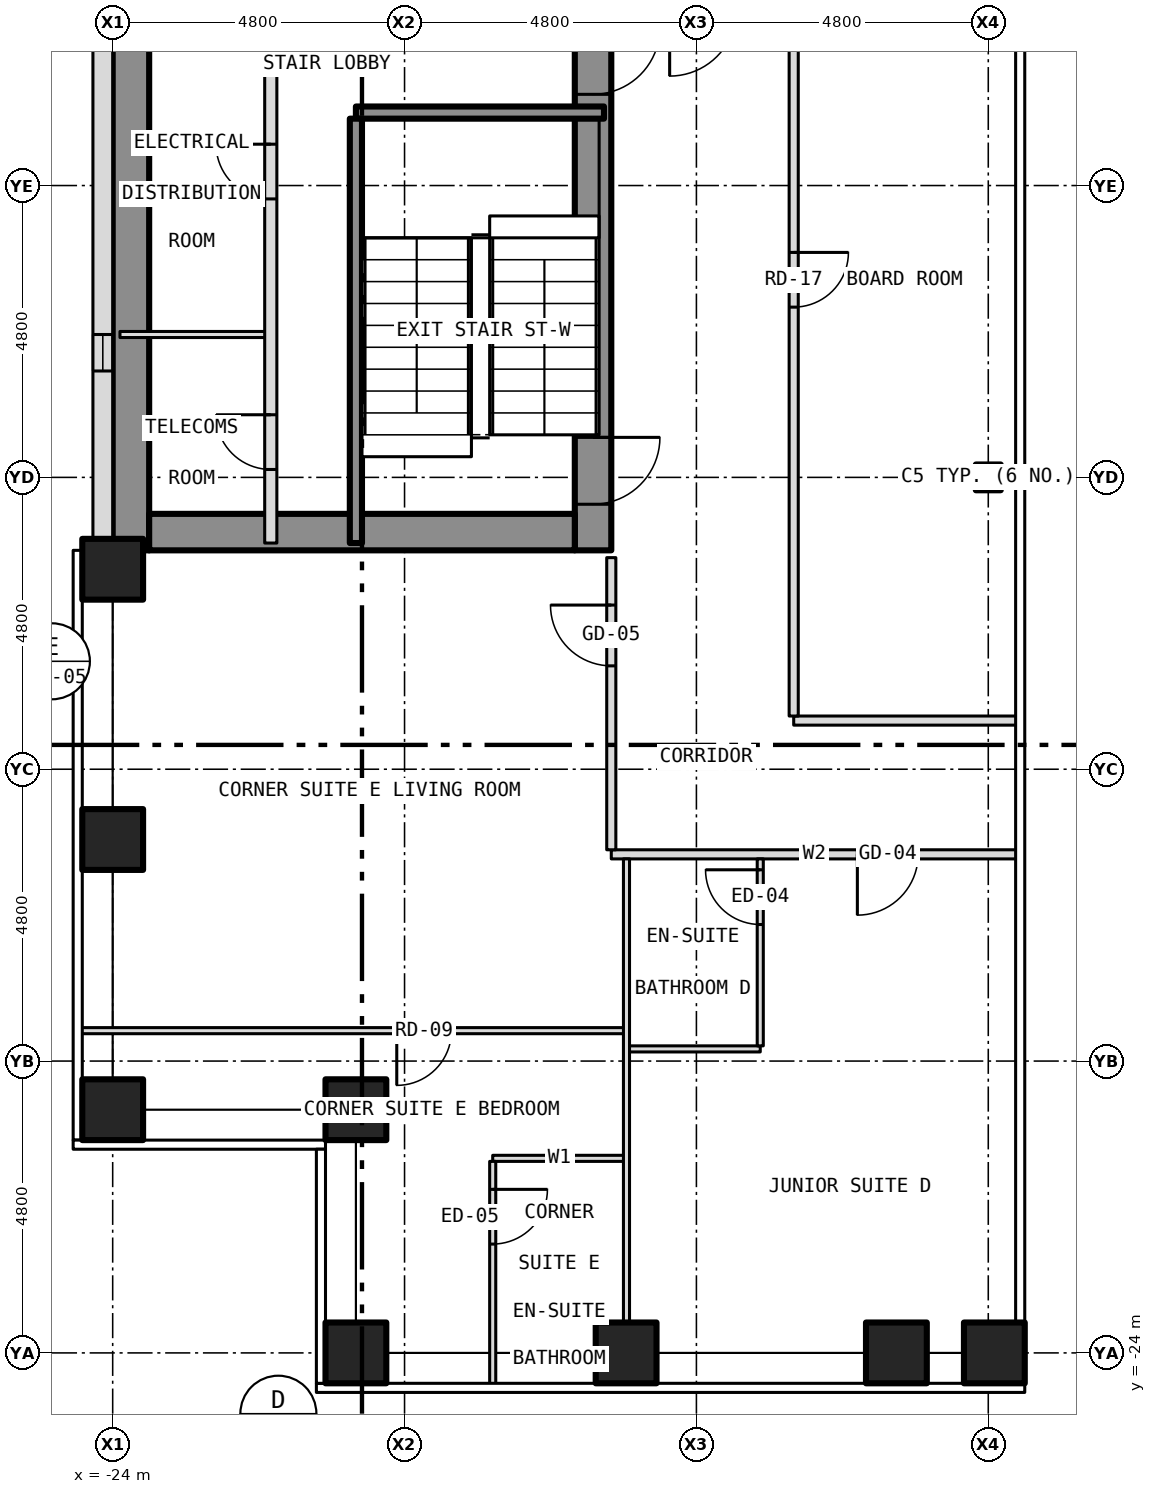
"""IFC4 building model, lengths in metres.
Left out: names, types, materials, properties, quantities, classifications, styles, units other than length and angle.
Written with IfcOpenShell. Run it as: python <this file> out.ifc"""

import sys

from ifc_helpers import new_model, si_unit, direction, frame, frame_2d, origin, origin_2d, place, context, subcontext, project, spatial, rectangle, hollow_rectangle, i_section, extrude, element, fill, save


model = new_model("IFC4")
c1 = context("Model", 3, precision=1e-05, world=origin(), true_north=direction((0.0, 1.0)))
c2 = subcontext(c1, "Body", "Model", "MODEL_VIEW")
j1 = project(units=[si_unit("LENGTHUNIT", "METRE"), si_unit("PLANEANGLEUNIT", "RADIAN")], contexts=[c1])
p1 = place(None, origin())
s1 = spatial("IfcSite", under=j1, at=p1, CompositionType="ELEMENT")
p2 = place(p1, origin())
s2 = spatial("IfcBuilding", under=s1, at=p2, CompositionType="ELEMENT")
p3 = place(p2, frame((0.0, 0.0, 77.5)))
s3 = spatial("IfcBuildingStorey", under=s2, at=p3, CompositionType="ELEMENT", Elevation=77.5)
for number, where, z_axis, x_axis in (
    (1, (-20.0, -24.0, -0.15), (0.0, 0.0, 1.0), (1.0, 0.0, 0.0)),
    (2, (-15.556, -24.0, -0.15), (0.0, 0.0, 1.0), (1.0, 0.0, 0.0)),
    (3, (-11.111, -24.0, -0.15), (0.0, 0.0, 1.0), (1.0, 0.0, 0.0)),
    (4, (-24.0, -20.0, -0.15), (0.0, 0.0, 1.0), (1.0, 0.0, 0.0)),
    (5, (-24.0, -15.556, -0.15), (0.0, 0.0, 1.0), (1.0, 0.0, 0.0)),
    (6, (-24.0, -11.111, -0.15), (0.0, 0.0, 1.0), (1.0, 0.0, 0.0)),
    (7, (-20.0, -20.0, -0.15), (0.0, 0.0, 1.0), (1.0, 0.0, 0.0)),
    (8, (-9.5, -24.0, -0.15), (0.0, 0.0, 1.0), (1.0, 0.0, 0.0)),
):
    element("IfcColumn", number, at=place(p3, frame(where, z_axis=z_axis, x_axis=x_axis)), inside=s3, PredefinedType="COLUMN", context=c2, shape_type="SweptSolid", body=[
        extrude(hollow_rectangle(XDim=1.0, YDim=1.0, WallThickness=0.06, at=origin_2d()), origin(), (0.0, 0.0, 1.0), 3.5),
    ])
p4 = place(p3, frame((-9.6, -9.6, -0.15), z_axis=(0.0, 0.0, 1.0), x_axis=(1.0, 0.0, 0.0)))
e9 = element("IfcColumn", 9, at=p4, inside=s3, PredefinedType="COLUMN", context=c2, shape_type="SweptSolid", body=[
    extrude(i_section(OverallWidth=0.409, OverallDepth=0.424, WebThickness=0.033, FlangeThickness=0.052, at=origin_2d()), origin(), (0.0, 0.0, 1.0), 3.5),
])
p5 = place(p3, frame((-16.1, -10.8, 0.0), z_axis=(0.0, 0.0, 1.0), x_axis=(0.0, 1.0, 0.0)))
e10 = element("IfcWall", 10, at=p5, inside=s3, PredefinedType="SHEAR", context=c2, shape_type="SweptSolid", body=[
    extrude(rectangle(XDim=21.6, YDim=0.6, at=frame_2d((10.8, 0.0))), origin(), (0.0, 0.0, 1.0), 3.25),
])
p6 = place(p5, frame((9.4, 0.0, 0.0)))
e11 = element("IfcOpeningElement", 11, at=p6, cuts=e10, PredefinedType="OPENING", context=c2, shape_type="SweptSolid", body=[
    extrude(rectangle(XDim=1.1, YDim=2.1, at=frame_2d((0.55, 1.05))), frame((0.0, 0.312, 0.0), z_axis=(0.0, -1.0, 0.0), x_axis=(1.0, 0.0, 0.0)), (0.0, 0.0, 1.0), 0.624),
])
p7 = place(p5, frame((11.5, 0.0, 0.0)))
e12 = element("IfcOpeningElement", 12, at=p7, cuts=e10, PredefinedType="OPENING", context=c2, shape_type="SweptSolid", body=[
    extrude(rectangle(XDim=1.1, YDim=2.1, at=frame_2d((0.55, 1.05))), frame((0.0, 0.312, 0.0), z_axis=(0.0, -1.0, 0.0), x_axis=(1.0, 0.0, 0.0)), (0.0, 0.0, 1.0), 0.624),
])
p8 = place(p5, frame((13.6, 0.0, 0.0)))
e13 = element("IfcOpeningElement", 13, at=p8, cuts=e10, PredefinedType="OPENING", context=c2, shape_type="SweptSolid", body=[
    extrude(rectangle(XDim=1.1, YDim=2.1, at=frame_2d((0.55, 1.05))), frame((0.0, 0.312, 0.0), z_axis=(0.0, -1.0, 0.0), x_axis=(1.0, 0.0, 0.0)), (0.0, 0.0, 1.0), 0.624),
])
p9 = place(p5, frame((15.7, 0.0, 0.0)))
e14 = element("IfcOpeningElement", 14, at=p9, cuts=e10, PredefinedType="OPENING", context=c2, shape_type="SweptSolid", body=[
    extrude(rectangle(XDim=1.1, YDim=2.1, at=frame_2d((0.55, 1.05))), frame((0.0, 0.312, 0.0), z_axis=(0.0, -1.0, 0.0), x_axis=(1.0, 0.0, 0.0)), (0.0, 0.0, 1.0), 0.624),
])
p10 = place(p5, frame((17.8, 0.0, 0.0)))
e15 = element("IfcOpeningElement", 15, at=p10, cuts=e10, PredefinedType="OPENING", context=c2, shape_type="SweptSolid", body=[
    extrude(rectangle(XDim=1.1, YDim=2.1, at=frame_2d((0.55, 1.05))), frame((0.0, 0.312, 0.0), z_axis=(0.0, -1.0, 0.0), x_axis=(1.0, 0.0, 0.0)), (0.0, 0.0, 1.0), 0.624),
])
p11 = place(p5, frame((0.758, 0.0, 0.0)))
e16 = element("IfcOpeningElement", 16, at=p11, cuts=e10, PredefinedType="OPENING", context=c2, shape_type="SweptSolid", body=[
    extrude(rectangle(XDim=1.1, YDim=2.1, at=frame_2d((0.55, 1.05))), frame((0.0, 0.312, 0.0), z_axis=(0.0, -1.0, 0.0), x_axis=(1.0, 0.0, 0.0)), (0.0, 0.0, 1.0), 0.624),
])
p12 = place(p5, frame((7.5, 0.0, 0.0)))
e17 = element("IfcOpeningElement", 17, at=p12, cuts=e10, PredefinedType="OPENING", context=c2, shape_type="SweptSolid", body=[
    extrude(rectangle(XDim=1.1, YDim=2.1, at=frame_2d((0.55, 1.05))), frame((0.0, 0.312, 0.0), z_axis=(0.0, -1.0, 0.0), x_axis=(1.0, 0.0, 0.0)), (0.0, 0.0, 1.0), 0.624),
])
p13 = place(p3, frame((-23.7, -10.8, 0.0), z_axis=(0.0, 0.0, 1.0), x_axis=(0.0, 1.0, 0.0)))
e18 = element("IfcWall", 18, at=p13, inside=s3, PredefinedType="SHEAR", context=c2, shape_type="SweptSolid", body=[
    extrude(rectangle(XDim=21.6, YDim=0.6, at=frame_2d((10.8, 0.0))), origin(), (0.0, 0.0, 1.0), 3.25),
])
p14 = place(p3, frame((-23.4, -10.5, 0.0), z_axis=(0.0, 0.0, 1.0), x_axis=(1.0, 0.0, 0.0)))
e19 = element("IfcWall", 19, at=p14, inside=s3, PredefinedType="SHEAR", context=c2, shape_type="SweptSolid", body=[
    extrude(rectangle(XDim=7.0, YDim=0.6, at=frame_2d((3.5, 0.0))), origin(), (0.0, 0.0, 1.0), 3.25),
])
p15 = place(p3, frame((-24.163, 10.8, 0.0), z_axis=(0.0, 0.0, 1.0), x_axis=(0.0, -1.0, 0.0)))
e20 = element("IfcWall", 20, at=p15, inside=s3, PredefinedType="SOLIDWALL", context=c2, shape_type="SweptSolid", body=[
    extrude(rectangle(XDim=21.6, YDim=0.325, at=frame_2d((10.8, 0.0))), origin(), (0.0, 0.0, 1.0), 3.5),
])
p16 = place(p15, frame((18.05, 0.0, 1.0)))
e21 = element("IfcOpeningElement", 21, at=p16, cuts=e20, PredefinedType="OPENING", context=c2, shape_type="SweptSolid", body=[
    extrude(rectangle(XDim=0.6, YDim=1.5, at=frame_2d((0.3, 0.75))), frame((0.0, 0.175, 0.0), z_axis=(0.0, -1.0, 0.0), x_axis=(1.0, 0.0, 0.0)), (0.0, 0.0, 1.0), 0.349),
])
for number, where, z_axis, x_axis in (
    (22, (-17.75, -20.8, 0.0), (0.0, 0.0, 1.0), (1.0, 0.0, 0.0)),
    (23, (-15.55, -19.0, 0.0), (0.0, 0.0, 1.0), (1.0, 0.0, 0.0)),
):
    element("IfcWall", number, at=place(p3, frame(where, z_axis=z_axis, x_axis=x_axis)), inside=s3, PredefinedType="PARTITIONING", context=c2, shape_type="SweptSolid", body=[
        extrude(rectangle(XDim=2.2, YDim=0.1, at=frame_2d((1.1, 0.0))), origin(), (0.0, 0.0, 1.0), 3.35),
    ])
p17 = place(p3, frame((-24.53, -18.7, 0.0), z_axis=(0.0, 0.0, 1.0), x_axis=(1.0, 0.0, 0.0)))
e24 = element("IfcWall", 24, at=p17, inside=s3, PredefinedType="PARTITIONING", context=c2, shape_type="SweptSolid", body=[
    extrude(rectangle(XDim=8.98, YDim=0.1, at=frame_2d((4.49, 0.0))), origin(), (0.0, 0.0, 1.0), 3.35),
])
p18 = place(p17, frame((5.202, 0.0, 0.0)))
e25 = element("IfcOpeningElement", 25, at=p18, cuts=e24, PredefinedType="OPENING", context=c2, shape_type="SweptSolid", body=[
    extrude(rectangle(XDim=0.9, YDim=2.1, at=frame_2d((0.45, 1.05))), frame((0.0, 0.062, 0.0), z_axis=(0.0, -1.0, 0.0), x_axis=(1.0, 0.0, 0.0)), (0.0, 0.0, 1.0), 0.124),
])
p19 = place(p3, frame((-15.8, -15.8, 0.0), z_axis=(0.0, 0.0, 1.0), x_axis=(1.0, 0.0, 0.0)))
e26 = element("IfcWall", 26, at=p19, inside=s3, PredefinedType="PARTITIONING", context=c2, shape_type="SweptSolid", body=[
    extrude(rectangle(XDim=6.68, YDim=0.15, at=frame_2d((3.34, 0.0))), origin(), (0.0, 0.0, 1.0), 3.35),
])
p20 = place(p19, frame((4.047, 0.0, 0.0)))
e27 = element("IfcOpeningElement", 27, at=p20, cuts=e26, PredefinedType="OPENING", context=c2, shape_type="SweptSolid", body=[
    extrude(rectangle(XDim=1.0, YDim=2.1, at=frame_2d((0.5, 1.05))), frame((0.0, 0.087, 0.0), z_axis=(0.0, -1.0, 0.0), x_axis=(1.0, 0.0, 0.0)), (0.0, 0.0, 1.0), 0.174),
])
p21 = place(p3, frame((-12.8, -13.6, 0.0), z_axis=(0.0, 0.0, 1.0), x_axis=(1.0, 0.0, 0.0)))
e28 = element("IfcWall", 28, at=p21, inside=s3, PredefinedType="PARTITIONING", context=c2, shape_type="SweptSolid", body=[
    extrude(rectangle(XDim=3.68, YDim=0.15, at=frame_2d((1.84, 0.0))), origin(), (0.0, 0.0, 1.0), 3.35),
])
p22 = place(p3, frame((-23.88, -7.25, 0.0), z_axis=(0.0, 0.0, 1.0), x_axis=(1.0, 0.0, 0.0)))
e29 = element("IfcWall", 29, at=p22, inside=s3, PredefinedType="PARTITIONING", context=c2, shape_type="SweptSolid", body=[
    extrude(rectangle(XDim=2.48, YDim=0.1, at=frame_2d((1.24, 0.0))), origin(), (0.0, 0.0, 1.0), 3.25),
])
p23 = place(p3, frame((-20.0, -3.6, 0.0), z_axis=(0.0, 0.0, 1.0), x_axis=(1.0, 0.0, 0.0)))
e30 = element("IfcWall", 30, at=p23, inside=s3, PredefinedType="SHEAR", context=c2, shape_type="SweptSolid", body=[
    extrude(rectangle(XDim=4.08, YDim=0.2, at=frame_2d((2.04, 0.0))), origin(), (0.0, 0.0, 1.0), 3.25),
])
p24 = place(p3, frame((-21.4, -10.68, 0.0), z_axis=(0.0, 0.0, 1.0), x_axis=(0.0, 1.0, 0.0)))
e31 = element("IfcWall", 31, at=p24, inside=s3, PredefinedType="PARTITIONING", context=c2, shape_type="SweptSolid", body=[
    extrude(rectangle(XDim=8.68, YDim=0.2, at=frame_2d((4.34, 0.0))), origin(), (0.0, 0.0, 1.0), 3.25),
])
p25 = place(p24, frame((1.21, 0.0, 0.0)))
e32 = element("IfcOpeningElement", 32, at=p25, cuts=e31, PredefinedType="OPENING", context=c2, shape_type="SweptSolid", body=[
    extrude(rectangle(XDim=0.9, YDim=2.1, at=frame_2d((0.45, 1.05))), frame((0.0, 0.112, 0.0), z_axis=(0.0, -1.0, 0.0), x_axis=(1.0, 0.0, 0.0)), (0.0, 0.0, 1.0), 0.224),
])
p26 = place(p24, frame((5.66, 0.0, 0.0)))
e33 = element("IfcOpeningElement", 33, at=p26, cuts=e31, PredefinedType="OPENING", context=c2, shape_type="SweptSolid", body=[
    extrude(rectangle(XDim=0.9, YDim=2.1, at=frame_2d((0.45, 1.05))), frame((0.0, 0.112, 0.0), z_axis=(0.0, -1.0, 0.0), x_axis=(1.0, 0.0, 0.0)), (0.0, 0.0, 1.0), 0.224),
])
p27 = place(p3, frame((-20.0, -10.68, 0.0), z_axis=(0.0, 0.0, 1.0), x_axis=(0.0, 1.0, 0.0)))
e34 = element("IfcWall", 34, at=p27, inside=s3, PredefinedType="SHEAR", context=c2, shape_type="SweptSolid", body=[
    extrude(rectangle(XDim=6.98, YDim=0.2, at=frame_2d((3.49, 0.0))), origin(), (0.0, 0.0, 1.0), 3.25),
])
p28 = place(p3, frame((-17.75, -24.53, 0.0), z_axis=(0.0, 0.0, 1.0), x_axis=(0.0, 1.0, 0.0)))
e35 = element("IfcWall", 35, at=p28, inside=s3, PredefinedType="PARTITIONING", context=c2, shape_type="SweptSolid", body=[
    extrude(rectangle(XDim=3.68, YDim=0.1, at=frame_2d((1.84, 0.0))), origin(), (0.0, 0.0, 1.0), 3.35),
])
p29 = place(p28, frame((2.32, 0.0, 0.0)))
e36 = element("IfcOpeningElement", 36, at=p29, cuts=e35, PredefinedType="OPENING", context=c2, shape_type="SweptSolid", body=[
    extrude(rectangle(XDim=0.9, YDim=2.1, at=frame_2d((0.45, 1.05))), frame((0.0, 0.062, 0.0), z_axis=(0.0, -1.0, 0.0), x_axis=(1.0, 0.0, 0.0)), (0.0, 0.0, 1.0), 0.124),
])
p30 = place(p3, frame((-15.8, -15.725, 0.0), z_axis=(0.0, 0.0, 1.0), x_axis=(0.0, 1.0, 0.0)))
e37 = element("IfcWall", 37, at=p30, inside=s3, PredefinedType="PARTITIONING", context=c2, shape_type="SweptSolid", body=[
    extrude(rectangle(XDim=4.805, YDim=0.15, at=frame_2d((2.403, 0.0))), origin(), (0.0, 0.0, 1.0), 3.35),
])
p31 = place(p30, frame((3.025, 0.0, 0.0)))
e38 = element("IfcOpeningElement", 38, at=p31, cuts=e37, PredefinedType="OPENING", context=c2, shape_type="SweptSolid", body=[
    extrude(rectangle(XDim=1.0, YDim=2.1, at=frame_2d((0.5, 1.05))), frame((0.0, 0.087, 0.0), z_axis=(0.0, -1.0, 0.0), x_axis=(1.0, 0.0, 0.0)), (0.0, 0.0, 1.0), 0.174),
])
p32 = place(p3, frame((-15.55, -23.88, 0.0), z_axis=(0.0, 0.0, 1.0), x_axis=(0.0, 1.0, 0.0)))
e39 = element("IfcWall", 39, at=p32, inside=s3, PredefinedType="PARTITIONING", context=c2, shape_type="SweptSolid", body=[
    extrude(rectangle(XDim=8.005, YDim=0.1, at=frame_2d((4.002, 0.0))), origin(), (0.0, 0.0, 1.0), 3.35),
])
p33 = place(p3, frame((-13.35, -18.95, 0.0), z_axis=(0.0, 0.0, 1.0), x_axis=(0.0, 1.0, 0.0)))
e40 = element("IfcWall", 40, at=p33, inside=s3, PredefinedType="PARTITIONING", context=c2, shape_type="SweptSolid", body=[
    extrude(rectangle(XDim=3.075, YDim=0.1, at=frame_2d((1.538, 0.0))), origin(), (0.0, 0.0, 1.0), 3.35),
])
p34 = place(p33, frame((1.996, 0.0, 0.0)))
e41 = element("IfcOpeningElement", 41, at=p34, cuts=e40, PredefinedType="OPENING", context=c2, shape_type="SweptSolid", body=[
    extrude(rectangle(XDim=0.9, YDim=2.1, at=frame_2d((0.45, 1.05))), frame((0.0, 0.062, 0.0), z_axis=(0.0, -1.0, 0.0), x_axis=(1.0, 0.0, 0.0)), (0.0, 0.0, 1.0), 0.124),
])
p35 = place(p3, frame((-12.8, -13.525, 0.0), z_axis=(0.0, 0.0, 1.0), x_axis=(0.0, 1.0, 0.0)))
e42 = element("IfcWall", 42, at=p35, inside=s3, PredefinedType="PARTITIONING", context=c2, shape_type="SweptSolid", body=[
    extrude(rectangle(XDim=11.525, YDim=0.15, at=frame_2d((5.762, 0.0))), origin(), (0.0, 0.0, 1.0), 3.35),
])
p36 = place(p35, frame((6.725, 0.0, 0.0)))
e43 = element("IfcOpeningElement", 43, at=p36, cuts=e42, PredefinedType="OPENING", context=c2, shape_type="SweptSolid", body=[
    extrude(rectangle(XDim=0.9, YDim=2.1, at=frame_2d((0.45, 1.05))), frame((0.0, 0.087, 0.0), z_axis=(0.0, -1.0, 0.0), x_axis=(1.0, 0.0, 0.0)), (0.0, 0.0, 1.0), 0.174),
])
p37 = place(p16, origin())
e44 = element("IfcWindow", 44, at=p37, inside=s3, PartitioningType="SINGLE_PANEL", PredefinedType="WINDOW", context=c2, shape_type="SweptSolid", body=[
    extrude(rectangle(XDim=0.6, YDim=1.5, at=frame_2d((0.3, 0.75))), frame((0.0, -0.073, 0.0), z_axis=(0.0, -1.0, 0.0), x_axis=(1.0, 0.0, 0.0)), (0.0, 0.0, 1.0), 0.06),
])
fill(e21, e44)
p38 = place(p11, origin())
e45 = element("IfcDoor", 45, at=p38, inside=s3, OperationType="SINGLE_SWING_RIGHT", PredefinedType="DOOR", context=c2, shape_type="SweptSolid", body=[
    extrude(rectangle(XDim=1.1, YDim=2.1, at=frame_2d((0.55, 1.05))), frame((0.0, 0.025, 0.0), z_axis=(0.0, -1.0, 0.0), x_axis=(1.0, 0.0, 0.0)), (0.0, 0.0, 1.0), 0.05),
])
fill(e16, e45)
p39 = place(p12, origin())
e46 = element("IfcDoor", 46, at=p39, inside=s3, OperationType="SINGLE_SWING_RIGHT", PredefinedType="DOOR", context=c2, shape_type="SweptSolid", body=[
    extrude(rectangle(XDim=1.1, YDim=2.1, at=frame_2d((0.55, 1.05))), frame((0.0, 0.025, 0.0), z_axis=(0.0, -1.0, 0.0), x_axis=(1.0, 0.0, 0.0)), (0.0, 0.0, 1.0), 0.05),
])
fill(e17, e46)
p40 = place(p25, origin())
e47 = element("IfcDoor", 47, at=p40, inside=s3, OperationType="SINGLE_SWING_RIGHT", PredefinedType="DOOR", context=c2, shape_type="SweptSolid", body=[
    extrude(rectangle(XDim=0.9, YDim=2.1, at=frame_2d((0.45, 1.05))), frame((0.0, 0.025, 0.0), z_axis=(0.0, -1.0, 0.0), x_axis=(1.0, 0.0, 0.0)), (0.0, 0.0, 1.0), 0.05),
])
fill(e32, e47)
p41 = place(p26, origin())
e48 = element("IfcDoor", 48, at=p41, inside=s3, OperationType="SINGLE_SWING_RIGHT", PredefinedType="DOOR", context=c2, shape_type="SweptSolid", body=[
    extrude(rectangle(XDim=0.9, YDim=2.1, at=frame_2d((0.45, 1.05))), frame((0.0, 0.025, 0.0), z_axis=(0.0, -1.0, 0.0), x_axis=(1.0, 0.0, 0.0)), (0.0, 0.0, 1.0), 0.05),
])
fill(e33, e48)
p42 = place(p20, origin())
e49 = element("IfcDoor", 49, at=p42, inside=s3, OperationType="SINGLE_SWING_LEFT", PredefinedType="DOOR", context=c2, shape_type="SweptSolid", body=[
    extrude(rectangle(XDim=1.0, YDim=2.1, at=frame_2d((0.5, 1.05))), frame((0.0, 0.025, 0.0), z_axis=(0.0, -1.0, 0.0), x_axis=(1.0, 0.0, 0.0)), (0.0, 0.0, 1.0), 0.05),
])
fill(e27, e49)
p43 = place(p34, origin())
e50 = element("IfcDoor", 50, at=p43, inside=s3, OperationType="SINGLE_SWING_RIGHT", PredefinedType="DOOR", context=c2, shape_type="SweptSolid", body=[
    extrude(rectangle(XDim=0.9, YDim=2.1, at=frame_2d((0.45, 1.05))), frame((0.0, 0.025, 0.0), z_axis=(0.0, -1.0, 0.0), x_axis=(1.0, 0.0, 0.0)), (0.0, 0.0, 1.0), 0.05),
])
fill(e41, e50)
p44 = place(p31, origin())
e51 = element("IfcDoor", 51, at=p44, inside=s3, OperationType="SINGLE_SWING_RIGHT", PredefinedType="DOOR", context=c2, shape_type="SweptSolid", body=[
    extrude(rectangle(XDim=1.0, YDim=2.1, at=frame_2d((0.5, 1.05))), frame((0.0, 0.025, 0.0), z_axis=(0.0, -1.0, 0.0), x_axis=(1.0, 0.0, 0.0)), (0.0, 0.0, 1.0), 0.05),
])
fill(e38, e51)
p45 = place(p18, origin())
e52 = element("IfcDoor", 52, at=p45, inside=s3, OperationType="SINGLE_SWING_LEFT", PredefinedType="DOOR", context=c2, shape_type="SweptSolid", body=[
    extrude(rectangle(XDim=0.9, YDim=2.1, at=frame_2d((0.45, 1.05))), frame((0.0, 0.025, 0.0), z_axis=(0.0, -1.0, 0.0), x_axis=(1.0, 0.0, 0.0)), (0.0, 0.0, 1.0), 0.05),
])
fill(e25, e52)
p46 = place(p29, origin())
e53 = element("IfcDoor", 53, at=p46, inside=s3, OperationType="SINGLE_SWING_RIGHT", PredefinedType="DOOR", context=c2, shape_type="SweptSolid", body=[
    extrude(rectangle(XDim=0.9, YDim=2.1, at=frame_2d((0.45, 1.05))), frame((0.0, 0.025, 0.0), z_axis=(0.0, -1.0, 0.0), x_axis=(1.0, 0.0, 0.0)), (0.0, 0.0, 1.0), 0.05),
])
fill(e36, e53)
p47 = place(p36, origin())
e54 = element("IfcDoor", 54, at=p47, inside=s3, OperationType="SINGLE_SWING_RIGHT", PredefinedType="DOOR", context=c2, shape_type="SweptSolid", body=[
    extrude(rectangle(XDim=0.9, YDim=2.1, at=frame_2d((0.45, 1.05))), frame((0.0, 0.025, 0.0), z_axis=(0.0, -1.0, 0.0), x_axis=(1.0, 0.0, 0.0)), (0.0, 0.0, 1.0), 0.05),
])
fill(e43, e54)
save(model, sys.argv[1])
